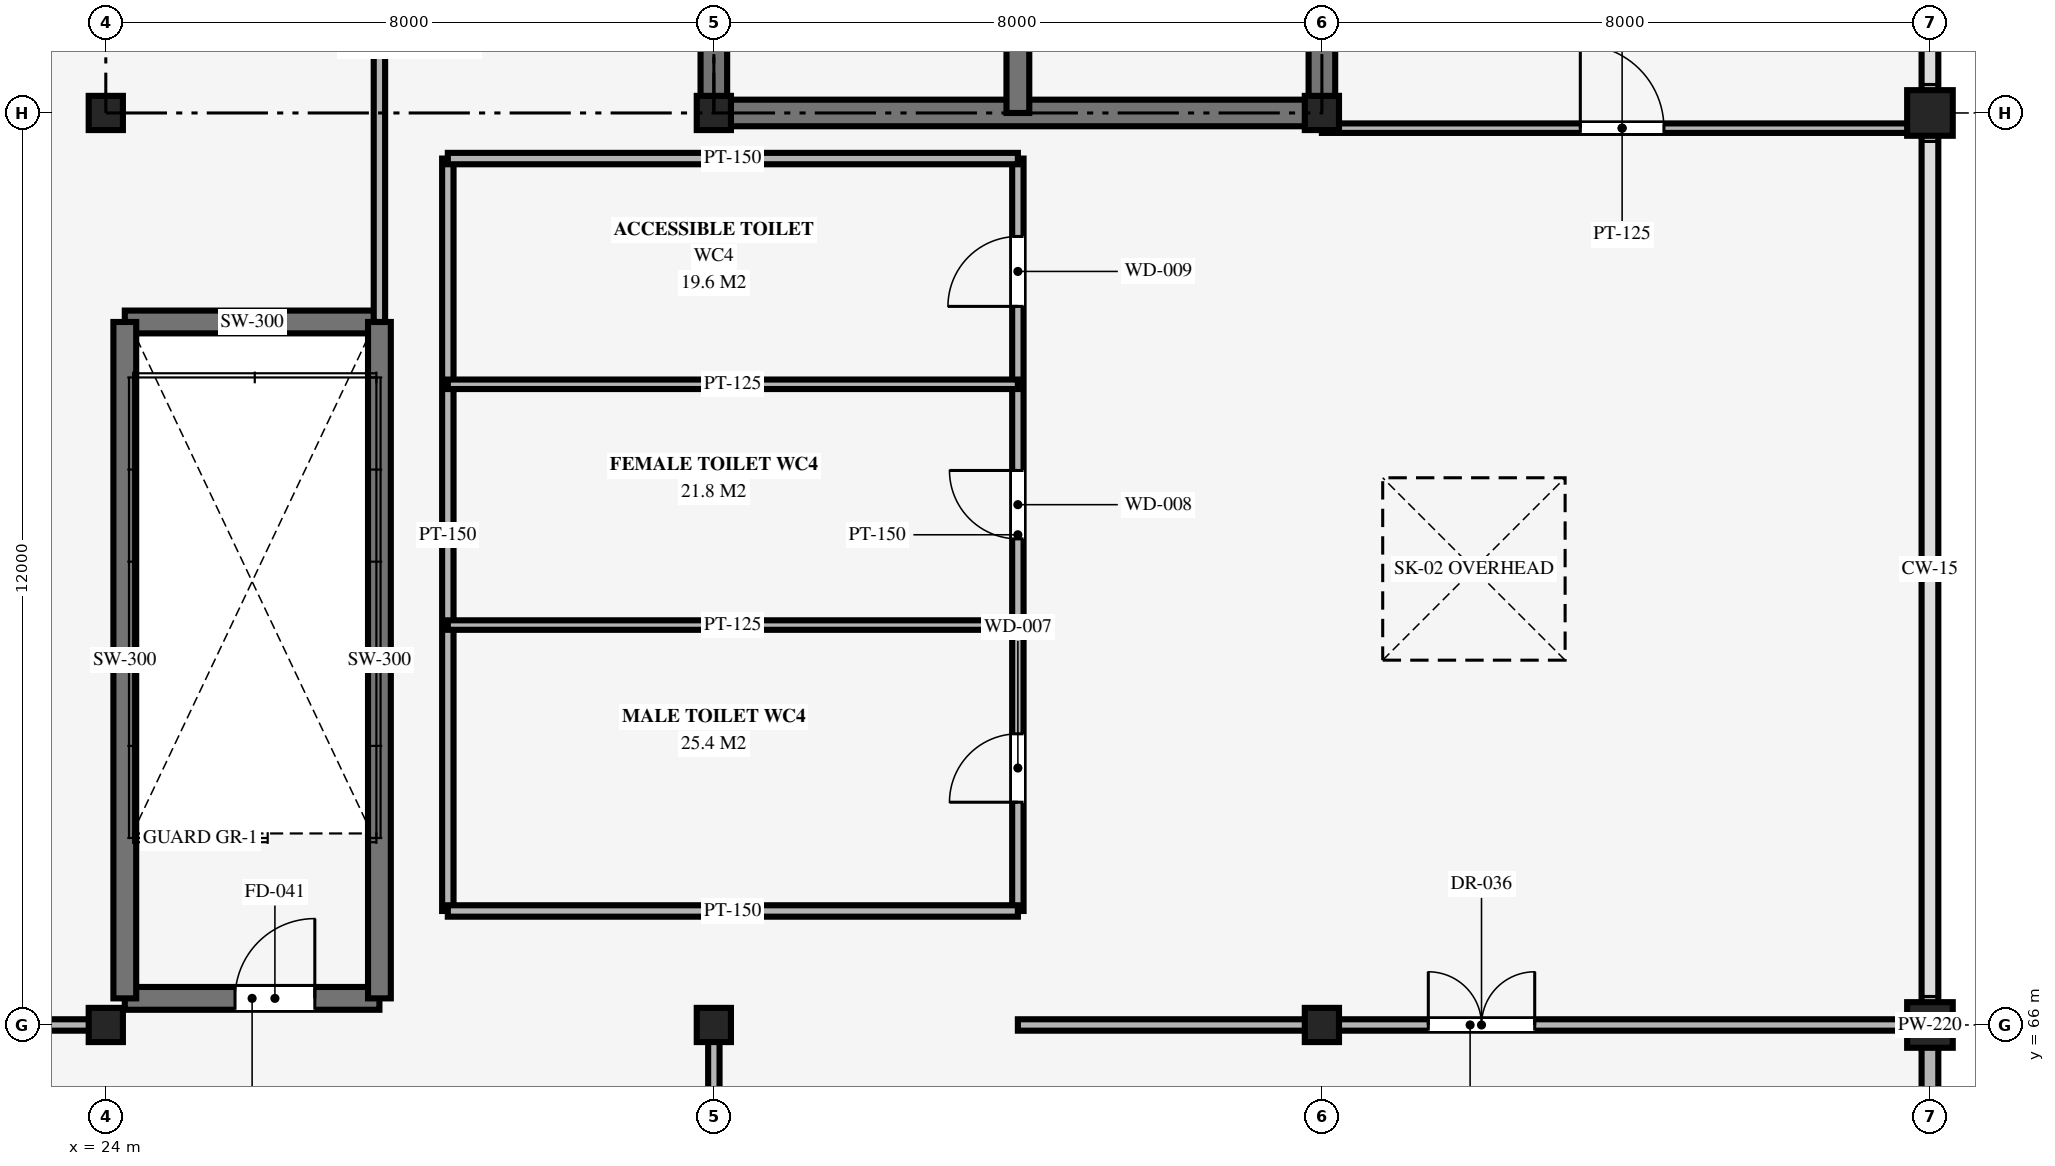
"""IFC4 building model, lengths in metres.
Left out: names, types, materials, properties, quantities, classifications, styles, units other than length and angle.
Written with IfcOpenShell. Run it as: python <this file> out.ifc"""

import sys

from ifc_helpers import new_model, si_unit, direction, frame, frame_2d, origin, origin_2d, place, context, subcontext, project, spatial, rectangle, circle, extrude, element, fill, save


model = new_model("IFC4")
c1 = context("Model", 3, precision=1e-05, world=origin(), true_north=direction((0.0, 1.0)))
c2 = subcontext(c1, "Body", "Model", "MODEL_VIEW")
j1 = project(units=[si_unit("LENGTHUNIT", "METRE"), si_unit("PLANEANGLEUNIT", "RADIAN")], contexts=[c1])
p1 = place(None, origin())
s1 = spatial("IfcSite", under=j1, at=p1, CompositionType="ELEMENT")
p2 = place(p1, origin())
s2 = spatial("IfcBuilding", under=s1, at=p2, CompositionType="ELEMENT")
p3 = place(p2, frame((0.0, 0.0, 10.2)))
s3 = spatial("IfcBuildingStorey", under=s2, at=p3, CompositionType="ELEMENT", Elevation=10.2)
for number, where, z_axis, x_axis in (
    (1, (24.0, 66.0, 0.0), (0.0, 0.0, 1.0), (1.0, 0.0, 0.0)),
    (2, (24.0, 78.0, 0.0), (0.0, 0.0, 1.0), (1.0, 0.0, 0.0)),
    (3, (32.0, 66.0, 0.0), (0.0, 0.0, 1.0), (1.0, 0.0, 0.0)),
    (4, (32.0, 78.0, 0.0), (0.0, 0.0, 1.0), (1.0, 0.0, 0.0)),
    (5, (40.0, 66.0, 0.0), (0.0, 0.0, 1.0), (1.0, 0.0, 0.0)),
    (6, (40.0, 78.0, 0.0), (0.0, 0.0, 1.0), (1.0, 0.0, 0.0)),
):
    element("IfcColumn", number, at=place(p3, frame(where, z_axis=z_axis, x_axis=x_axis)), inside=s3, PredefinedType="COLUMN", context=c2, shape_type="SweptSolid", body=[
        extrude(rectangle(XDim=0.45, YDim=0.45, at=origin_2d()), origin(), (0.0, 0.0, 1.0), 4.64),
    ])
for number, where, z_axis, x_axis in (
    (7, (48.0, 66.0, 0.0), (0.0, 0.0, 1.0), (1.0, 0.0, 0.0)),
    (8, (48.0, 78.0, 0.0), (0.0, 0.0, 1.0), (1.0, 0.0, 0.0)),
):
    element("IfcColumn", number, at=place(p3, frame(where, z_axis=z_axis, x_axis=x_axis)), inside=s3, PredefinedType="COLUMN", context=c2, shape_type="SweptSolid", body=[
        extrude(circle(Radius=0.3, at=origin_2d()), origin(), (0.0, 0.0, 1.0), 4.64),
    ])
p4 = place(p3, frame((48.0, 42.0, 4.8), z_axis=(0.0, 0.0, 1.0), x_axis=(0.0, 1.0, 0.0)))
e9 = element("IfcWall", 9, at=p4, inside=s3, PredefinedType="PARAPET", context=c2, shape_type="SweptSolid", body=[
    extrude(rectangle(XDim=48.0, YDim=0.22, at=frame_2d((24.0, 0.0))), origin(), (0.0, 0.0, 1.0), 1.15),
])
p5 = place(p3, frame((32.0, 78.0, 0.0), z_axis=(0.0, 0.0, 1.0), x_axis=(1.0, 0.0, 0.0)))
e10 = element("IfcWall", 10, at=p5, inside=s3, PredefinedType="SHEAR", context=c2, shape_type="SweptSolid", body=[
    extrude(rectangle(XDim=8.0, YDim=0.35, at=frame_2d((4.0, 0.0))), origin(), (0.0, 0.0, 1.0), 4.78),
])
p6 = place(p3, frame((32.0, 78.0, 0.0), z_axis=(0.0, 0.0, 1.0), x_axis=(0.0, 1.0, 0.0)))
e11 = element("IfcWall", 11, at=p6, inside=s3, PredefinedType="SHEAR", context=c2, shape_type="SweptSolid", body=[
    extrude(rectangle(XDim=12.0, YDim=0.35, at=frame_2d((6.0, 0.0))), origin(), (0.0, 0.0, 1.0), 4.78),
])
p7 = place(p3, frame((40.0, 78.0, 0.0), z_axis=(0.0, 0.0, 1.0), x_axis=(0.0, 1.0, 0.0)))
e12 = element("IfcWall", 12, at=p7, inside=s3, PredefinedType="SHEAR", context=c2, shape_type="SweptSolid", body=[
    extrude(rectangle(XDim=12.0, YDim=0.35, at=frame_2d((6.0, 0.0))), origin(), (0.0, 0.0, 1.0), 4.78),
])
p8 = place(p7, frame((1.4, 0.0, 0.0)))
e13 = element("IfcOpeningElement", 13, at=p8, cuts=e12, PredefinedType="OPENING", context=c2, shape_type="SweptSolid", body=[
    extrude(rectangle(XDim=1.5, YDim=2.2, at=frame_2d((0.75, 1.1))), frame((0.0, 0.185, 0.0), z_axis=(0.0, -1.0, 0.0), x_axis=(1.0, 0.0, 0.0)), (0.0, 0.0, 1.0), 0.37),
])
p9 = place(p3, frame((36.0, 90.0, 0.0), z_axis=(0.0, 0.0, 1.0), x_axis=(0.0, -1.0, 0.0)))
e14 = element("IfcWall", 14, at=p9, inside=s3, PredefinedType="SHEAR", context=c2, shape_type="SweptSolid", body=[
    extrude(rectangle(XDim=12.0, YDim=0.3, at=frame_2d((6.0, 0.0))), origin(), (0.0, 0.0, 1.0), 4.78),
])
p10 = place(p9, frame((10.05, 0.0, 0.0)))
e15 = element("IfcOpeningElement", 15, at=p10, cuts=e14, PredefinedType="OPENING", context=c2, shape_type="SweptSolid", body=[
    extrude(rectangle(XDim=1.05, YDim=2.15, at=frame_2d((0.525, 1.075))), frame((0.0, 0.16, 0.0), z_axis=(0.0, -1.0, 0.0), x_axis=(1.0, 0.0, 0.0)), (0.0, 0.0, 1.0), 0.32),
])
p11 = place(p3, frame((24.25, 66.35, 0.0), z_axis=(0.0, 0.0, 1.0), x_axis=(1.0, 0.0, 0.0)))
e16 = element("IfcWall", 16, at=p11, inside=s3, PredefinedType="SHEAR", context=c2, shape_type="SweptSolid", body=[
    extrude(rectangle(XDim=3.35, YDim=0.3, at=frame_2d((1.675, 0.0))), origin(), (0.0, 0.0, 1.0), 4.78),
])
p12 = place(p11, frame((1.45, 0.0, 0.0)))
e17 = element("IfcOpeningElement", 17, at=p12, cuts=e16, PredefinedType="OPENING", context=c2, shape_type="SweptSolid", body=[
    extrude(rectangle(XDim=1.05, YDim=2.15, at=frame_2d((0.525, 1.075))), frame((0.0, 0.16, 0.0), z_axis=(0.0, -1.0, 0.0), x_axis=(1.0, 0.0, 0.0)), (0.0, 0.0, 1.0), 0.32),
])
p13 = place(p3, frame((24.25, 75.25, 0.0), z_axis=(0.0, 0.0, 1.0), x_axis=(1.0, 0.0, 0.0)))
e18 = element("IfcWall", 18, at=p13, inside=s3, PredefinedType="SHEAR", context=c2, shape_type="SweptSolid", body=[
    extrude(rectangle(XDim=3.35, YDim=0.3, at=frame_2d((1.675, 0.0))), origin(), (0.0, 0.0, 1.0), 4.78),
])
for number, where, z_axis, x_axis in (
    (19, (24.25, 66.35, 0.0), (0.0, 0.0, 1.0), (0.0, 1.0, 0.0)),
    (20, (27.6, 66.35, 0.0), (0.0, 0.0, 1.0), (0.0, 1.0, 0.0)),
):
    element("IfcWall", number, at=place(p3, frame(where, z_axis=z_axis, x_axis=x_axis)), inside=s3, PredefinedType="SHEAR", context=c2, shape_type="SweptSolid", body=[
        extrude(rectangle(XDim=8.9, YDim=0.3, at=frame_2d((4.45, 0.0))), origin(), (0.0, 0.0, 1.0), 4.78),
    ])
p14 = place(p3, frame((28.5, 67.5, 0.0), z_axis=(0.0, 0.0, 1.0), x_axis=(0.0, 1.0, 0.0)))
e21 = element("IfcWall", 21, at=p14, inside=s3, PredefinedType="PARTITIONING", context=c2, shape_type="SweptSolid", body=[
    extrude(rectangle(XDim=9.9, YDim=0.15, at=frame_2d((4.95, 0.0))), origin(), (0.0, 0.0, 1.0), 3.65),
])
p15 = place(p3, frame((36.0, 67.5, 0.0), z_axis=(0.0, 0.0, 1.0), x_axis=(0.0, 1.0, 0.0)))
e22 = element("IfcWall", 22, at=p15, inside=s3, PredefinedType="PARTITIONING", context=c2, shape_type="SweptSolid", body=[
    extrude(rectangle(XDim=9.9, YDim=0.15, at=frame_2d((4.95, 0.0))), origin(), (0.0, 0.0, 1.0), 3.65),
])
p16 = place(p15, frame((1.431, 0.0, 0.0)))
e23 = element("IfcOpeningElement", 23, at=p16, cuts=e22, PredefinedType="OPENING", context=c2, shape_type="SweptSolid", body=[
    extrude(rectangle(XDim=0.9, YDim=2.1, at=frame_2d((0.45, 1.05))), frame((0.0, 0.085, 0.0), z_axis=(0.0, -1.0, 0.0), x_axis=(1.0, 0.0, 0.0)), (0.0, 0.0, 1.0), 0.17),
])
p17 = place(p15, frame((4.896, 0.0, 0.0)))
e24 = element("IfcOpeningElement", 24, at=p17, cuts=e22, PredefinedType="OPENING", context=c2, shape_type="SweptSolid", body=[
    extrude(rectangle(XDim=0.9, YDim=2.1, at=frame_2d((0.45, 1.05))), frame((0.0, 0.085, 0.0), z_axis=(0.0, -1.0, 0.0), x_axis=(1.0, 0.0, 0.0)), (0.0, 0.0, 1.0), 0.17),
])
p18 = place(p15, frame((7.955, 0.0, 0.0)))
e25 = element("IfcOpeningElement", 25, at=p18, cuts=e22, PredefinedType="OPENING", context=c2, shape_type="SweptSolid", body=[
    extrude(rectangle(XDim=0.92, YDim=2.1, at=frame_2d((0.46, 1.05))), frame((0.0, 0.085, 0.0), z_axis=(0.0, -1.0, 0.0), x_axis=(1.0, 0.0, 0.0)), (0.0, 0.0, 1.0), 0.17),
])
for number, where, z_axis, x_axis in (
    (26, (28.5, 77.4, 0.0), (0.0, 0.0, 1.0), (1.0, 0.0, 0.0)),
    (27, (28.5, 67.5, 0.0), (0.0, 0.0, 1.0), (1.0, 0.0, 0.0)),
):
    element("IfcWall", number, at=place(p3, frame(where, z_axis=z_axis, x_axis=x_axis)), inside=s3, PredefinedType="PARTITIONING", context=c2, shape_type="SweptSolid", body=[
        extrude(rectangle(XDim=7.5, YDim=0.15, at=frame_2d((3.75, 0.0))), origin(), (0.0, 0.0, 1.0), 3.65),
    ])
for number, where, z_axis, x_axis in (
    (28, (28.5, 71.262, 0.0), (0.0, 0.0, 1.0), (1.0, 0.0, 0.0)),
    (29, (28.5, 74.43, 0.0), (0.0, 0.0, 1.0), (1.0, 0.0, 0.0)),
):
    element("IfcWall", number, at=place(p3, frame(where, z_axis=z_axis, x_axis=x_axis)), inside=s3, PredefinedType="PARTITIONING", context=c2, shape_type="SweptSolid", body=[
        extrude(rectangle(XDim=7.5, YDim=0.125, at=frame_2d((3.75, 0.0))), origin(), (0.0, 0.0, 1.0), 3.65),
    ])
p19 = place(p3, frame((32.0, 42.6, 0.0), z_axis=(0.0, 0.0, 1.0), x_axis=(0.0, 1.0, 0.0)))
e30 = element("IfcWall", 30, at=p19, inside=s3, PredefinedType="PARTITIONING", context=c2, shape_type="SweptSolid", body=[
    extrude(rectangle(XDim=23.4, YDim=0.15, at=frame_2d((11.7, 0.0))), origin(), (0.0, 0.0, 1.0), 3.65),
])
p20 = place(p19, frame((8.5, 0.0, 0.0)))
e31 = element("IfcOpeningElement", 31, at=p20, cuts=e30, PredefinedType="OPENING", context=c2, shape_type="SweptSolid", body=[
    extrude(rectangle(XDim=1.4, YDim=2.15, at=frame_2d((0.7, 1.075))), frame((0.0, 0.085, 0.0), z_axis=(0.0, -1.0, 0.0), x_axis=(1.0, 0.0, 0.0)), (0.0, 0.0, 1.0), 0.17),
])
p21 = place(p3, frame((2.0, 66.0, 0.0), z_axis=(0.0, 0.0, 1.0), x_axis=(1.0, 0.0, 0.0)))
e32 = element("IfcWall", 32, at=p21, inside=s3, PredefinedType="PARTITIONING", context=c2, shape_type="SweptSolid", body=[
    extrude(rectangle(XDim=22.15, YDim=0.15, at=frame_2d((11.075, 0.0))), origin(), (0.0, 0.0, 1.0), 3.65),
])
p22 = place(p21, frame((10.5, 0.0, 0.0)))
e33 = element("IfcOpeningElement", 33, at=p22, cuts=e32, PredefinedType="OPENING", context=c2, shape_type="SweptSolid", body=[
    extrude(rectangle(XDim=1.4, YDim=2.15, at=frame_2d((0.7, 1.075))), frame((0.0, 0.085, 0.0), z_axis=(0.0, -1.0, 0.0), x_axis=(1.0, 0.0, 0.0)), (0.0, 0.0, 1.0), 0.17),
])
p23 = place(p3, frame((27.6, 75.25, 0.0), z_axis=(0.0, 0.0, 1.0), x_axis=(0.0, 1.0, 0.0)))
e34 = element("IfcWall", 34, at=p23, inside=s3, PredefinedType="PARTITIONING", context=c2, shape_type="SweptSolid", body=[
    extrude(rectangle(XDim=13.95, YDim=0.15, at=frame_2d((6.975, 0.0))), origin(), (0.0, 0.0, 1.0), 3.65),
])
p24 = place(p23, frame((5.2, 0.0, 0.0)))
e35 = element("IfcOpeningElement", 35, at=p24, cuts=e34, PredefinedType="OPENING", context=c2, shape_type="SweptSolid", body=[
    extrude(rectangle(XDim=1.05, YDim=2.15, at=frame_2d((0.525, 1.075))), frame((0.0, 0.085, 0.0), z_axis=(0.0, -1.0, 0.0), x_axis=(1.0, 0.0, 0.0)), (0.0, 0.0, 1.0), 0.17),
])
p25 = place(p3, frame((40.0, 77.8, 0.0), z_axis=(0.0, 0.0, 1.0), x_axis=(1.0, 0.0, 0.0)))
e36 = element("IfcWall", 36, at=p25, inside=s3, PredefinedType="PARTITIONING", context=c2, shape_type="SweptSolid", body=[
    extrude(rectangle(XDim=7.9, YDim=0.125, at=frame_2d((3.95, 0.0))), origin(), (0.0, 0.0, 1.0), 3.65),
])
p26 = place(p25, frame((3.4, 0.0, 0.0)))
e37 = element("IfcOpeningElement", 37, at=p26, cuts=e36, PredefinedType="OPENING", context=c2, shape_type="SweptSolid", body=[
    extrude(rectangle(XDim=1.1, YDim=2.15, at=frame_2d((0.55, 1.075))), frame((0.0, 0.073, 0.0), z_axis=(0.0, -1.0, 0.0), x_axis=(1.0, 0.0, 0.0)), (0.0, 0.0, 1.0), 0.145),
])
p27 = place(p3, frame((36.0, 66.0, 0.0), z_axis=(0.0, 0.0, 1.0), x_axis=(1.0, 0.0, 0.0)))
e38 = element("IfcWall", 38, at=p27, inside=s3, PredefinedType="PARTITIONING", context=c2, shape_type="SweptSolid", body=[
    extrude(rectangle(XDim=11.9, YDim=0.15, at=frame_2d((5.95, 0.0))), origin(), (0.0, 0.0, 1.0), 3.65),
])
p28 = place(p27, frame((5.4, 0.0, 0.0)))
e39 = element("IfcOpeningElement", 39, at=p28, cuts=e38, PredefinedType="OPENING", context=c2, shape_type="SweptSolid", body=[
    extrude(rectangle(XDim=1.4, YDim=2.15, at=frame_2d((0.7, 1.075))), frame((0.0, 0.085, 0.0), z_axis=(0.0, -1.0, 0.0), x_axis=(1.0, 0.0, 0.0)), (0.0, 0.0, 1.0), 0.17),
])
p29 = place(p2, frame((0.0, 0.0, 27.9)))
p30 = place(p29, frame((0.0, 0.0, -13.14)))
p31 = place(p30, frame((42.0, 72.0, 0.0)))
p32 = place(p31, frame((0.0, 0.0, 0.19)))
e40 = element("IfcWindow", 40, at=p32, inside=s3, PartitioningType="SINGLE_PANEL", PredefinedType="SKYLIGHT", context=c2, shape_type="SweptSolid", body=[
    extrude(rectangle(XDim=2.4, YDim=2.4, at=origin_2d()), origin(), (0.0, 0.0, 1.0), 0.05),
])
p33 = place(p12, origin())
e41 = element("IfcDoor", 41, at=p33, inside=s3, OperationType="SINGLE_SWING_RIGHT", PredefinedType="DOOR", context=c2, shape_type="SweptSolid", body=[
    extrude(rectangle(XDim=1.05, YDim=2.15, at=frame_2d((0.525, 1.075))), frame((0.0, 0.025, 0.0), z_axis=(0.0, -1.0, 0.0), x_axis=(1.0, 0.0, 0.0)), (0.0, 0.0, 1.0), 0.05),
])
fill(e17, e41)
p34 = place(p16, origin())
e42 = element("IfcDoor", 42, at=p34, inside=s3, OperationType="SINGLE_SWING_LEFT", PredefinedType="DOOR", context=c2, shape_type="SweptSolid", body=[
    extrude(rectangle(XDim=0.9, YDim=2.1, at=frame_2d((0.45, 1.05))), frame((0.0, 0.025, 0.0), z_axis=(0.0, -1.0, 0.0), x_axis=(1.0, 0.0, 0.0)), (0.0, 0.0, 1.0), 0.05),
])
fill(e23, e42)
p35 = place(p17, origin())
e43 = element("IfcDoor", 43, at=p35, inside=s3, OperationType="SINGLE_SWING_RIGHT", PredefinedType="DOOR", context=c2, shape_type="SweptSolid", body=[
    extrude(rectangle(XDim=0.9, YDim=2.1, at=frame_2d((0.45, 1.05))), frame((0.0, 0.025, 0.0), z_axis=(0.0, -1.0, 0.0), x_axis=(1.0, 0.0, 0.0)), (0.0, 0.0, 1.0), 0.05),
])
fill(e24, e43)
p36 = place(p18, origin())
e44 = element("IfcDoor", 44, at=p36, inside=s3, OperationType="SINGLE_SWING_LEFT", PredefinedType="DOOR", context=c2, shape_type="SweptSolid", body=[
    extrude(rectangle(XDim=0.92, YDim=2.1, at=frame_2d((0.46, 1.05))), frame((0.0, 0.025, 0.0), z_axis=(0.0, -1.0, 0.0), x_axis=(1.0, 0.0, 0.0)), (0.0, 0.0, 1.0), 0.05),
])
fill(e25, e44)
p37 = place(p26, origin())
e45 = element("IfcDoor", 45, at=p37, inside=s3, OperationType="SINGLE_SWING_LEFT", PredefinedType="DOOR", context=c2, shape_type="SweptSolid", body=[
    extrude(rectangle(XDim=1.1, YDim=2.15, at=frame_2d((0.55, 1.075))), frame((0.0, 0.025, 0.0), z_axis=(0.0, -1.0, 0.0), x_axis=(1.0, 0.0, 0.0)), (0.0, 0.0, 1.0), 0.05),
])
fill(e37, e45)
p38 = place(p28, origin())
e46 = element("IfcDoor", 46, at=p38, inside=s3, OperationType="DOUBLE_DOOR_SINGLE_SWING", PredefinedType="DOOR", context=c2, shape_type="SweptSolid", body=[
    extrude(rectangle(XDim=1.4, YDim=2.15, at=frame_2d((0.7, 1.075))), frame((0.0, 0.025, 0.0), z_axis=(0.0, -1.0, 0.0), x_axis=(1.0, 0.0, 0.0)), (0.0, 0.0, 1.0), 0.05),
])
fill(e39, e46)
save(model, sys.argv[1])
